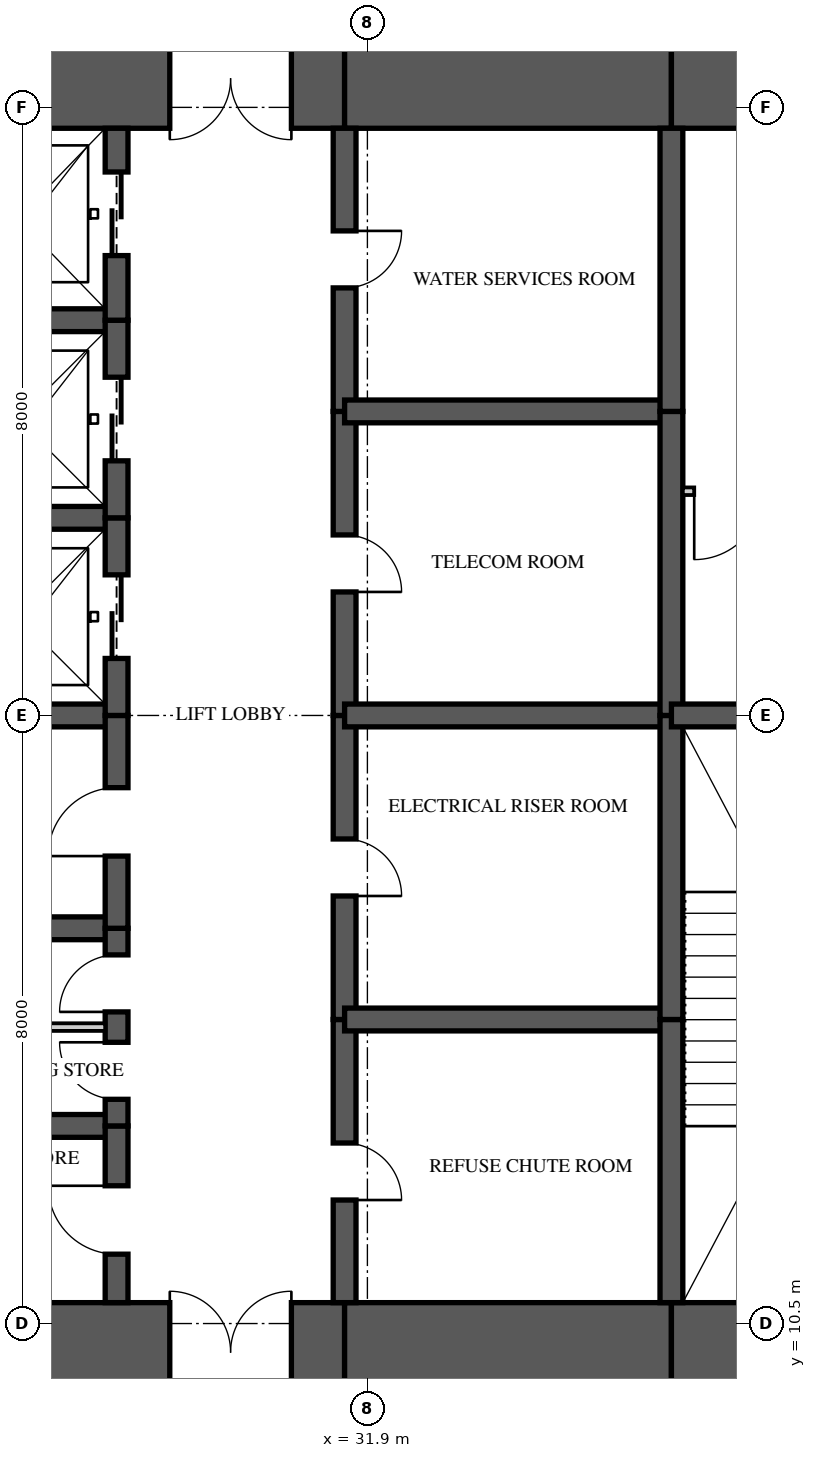
"""IFC4 building model, lengths in metres.
Left out: names, types, materials, properties, quantities, classifications, styles, units other than length and angle.
Written with IfcOpenShell. Run it as: python <this file> out.ifc"""

import sys

from ifc_helpers import new_model, si_unit, direction, frame, frame_2d, origin, place, context, subcontext, project, spatial, rectangle, extrude, element, fill, save


model = new_model("IFC4")
c1 = context("Model", 3, precision=1e-05, world=origin(), true_north=direction((0.0, 1.0)))
c2 = subcontext(c1, "Body", "Model", "MODEL_VIEW")
j1 = project(units=[si_unit("LENGTHUNIT", "METRE"), si_unit("PLANEANGLEUNIT", "RADIAN")], contexts=[c1])
p1 = place(None, origin())
s1 = spatial("IfcSite", under=j1, at=p1, CompositionType="ELEMENT")
p2 = place(p1, origin())
s2 = spatial("IfcBuilding", under=s1, at=p2, CompositionType="ELEMENT")
p3 = place(p2, frame((0.0, 0.0, 157.7)))
s3 = spatial("IfcBuildingStorey", under=s2, at=p3, CompositionType="ELEMENT", Elevation=157.7)
p4 = place(p3, frame((26.0, 10.125, 0.0), z_axis=(0.0, 0.0, 1.0), x_axis=(1.0, 0.0, 0.0)))
e1 = element("IfcWall", 1, at=p4, inside=s3, PredefinedType="SHEAR", context=c2, shape_type="SweptSolid", body=[
    extrude(rectangle(XDim=5.6, YDim=1.3, at=frame_2d((2.8, 0.0))), origin(), (0.0, 0.0, 1.0), 3.35),
])
p5 = place(p4, frame((3.3, 0.0, 0.0)))
e2 = element("IfcOpeningElement", 2, at=p5, cuts=e1, PredefinedType="OPENING", context=c2, shape_type="SweptSolid", body=[
    extrude(rectangle(XDim=1.6, YDim=2.1, at=frame_2d((0.8, 1.05))), frame((0.0, 0.66, 0.0), z_axis=(0.0, -1.0, 0.0), x_axis=(1.0, 0.0, 0.0)), (0.0, 0.0, 1.0), 1.32),
])
p6 = place(p3, frame((31.6, 10.125, 0.0), z_axis=(0.0, 0.0, 1.0), x_axis=(1.0, 0.0, 0.0)))
e3 = element("IfcWall", 3, at=p6, inside=s3, PredefinedType="SHEAR", context=c2, shape_type="SweptSolid", body=[
    extrude(rectangle(XDim=4.3, YDim=1.3, at=frame_2d((2.15, 0.0))), origin(), (0.0, 0.0, 1.0), 3.35),
])
p7 = place(p3, frame((35.9, 10.125, 0.0), z_axis=(0.0, 0.0, 1.0), x_axis=(1.0, 0.0, 0.0)))
e4 = element("IfcWall", 4, at=p7, inside=s3, PredefinedType="SHEAR", context=c2, shape_type="SweptSolid", body=[
    extrude(rectangle(XDim=8.25, YDim=1.3, at=frame_2d((4.125, 0.0))), origin(), (0.0, 0.0, 1.0), 3.35),
])
p8 = place(p7, frame((2.7, 0.0, 0.0)))
e5 = element("IfcOpeningElement", 5, at=p8, cuts=e4, PredefinedType="OPENING", context=c2, shape_type="SweptSolid", body=[
    extrude(rectangle(XDim=1.0, YDim=2.1, at=frame_2d((0.5, 1.05))), frame((0.0, 0.66, 0.0), z_axis=(0.0, -1.0, 0.0), x_axis=(1.0, 0.0, 0.0)), (0.0, 0.0, 1.0), 1.32),
])
p9 = place(p3, frame((44.15, 26.875, 0.0), z_axis=(0.0, 0.0, 1.0), x_axis=(-1.0, 0.0, 0.0)))
e6 = element("IfcWall", 6, at=p9, inside=s3, PredefinedType="SHEAR", context=c2, shape_type="SweptSolid", body=[
    extrude(rectangle(XDim=8.25, YDim=1.3, at=frame_2d((4.125, 0.0))), origin(), (0.0, 0.0, 1.0), 3.35),
])
p10 = place(p9, frame((5.65, 0.0, 0.0)))
e7 = element("IfcOpeningElement", 7, at=p10, cuts=e6, PredefinedType="OPENING", context=c2, shape_type="SweptSolid", body=[
    extrude(rectangle(XDim=0.9, YDim=2.1, at=frame_2d((0.45, 1.05))), frame((0.0, 0.66, 0.0), z_axis=(0.0, -1.0, 0.0), x_axis=(1.0, 0.0, 0.0)), (0.0, 0.0, 1.0), 1.32),
])
p11 = place(p3, frame((35.9, 26.875, 0.0), z_axis=(0.0, 0.0, 1.0), x_axis=(-1.0, 0.0, 0.0)))
e8 = element("IfcWall", 8, at=p11, inside=s3, PredefinedType="SHEAR", context=c2, shape_type="SweptSolid", body=[
    extrude(rectangle(XDim=4.3, YDim=1.3, at=frame_2d((2.15, 0.0))), origin(), (0.0, 0.0, 1.0), 3.35),
])
p12 = place(p3, frame((31.6, 26.875, 0.0), z_axis=(0.0, 0.0, 1.0), x_axis=(-1.0, 0.0, 0.0)))
e9 = element("IfcWall", 9, at=p12, inside=s3, PredefinedType="SHEAR", context=c2, shape_type="SweptSolid", body=[
    extrude(rectangle(XDim=5.6, YDim=1.3, at=frame_2d((2.8, 0.0))), origin(), (0.0, 0.0, 1.0), 3.35),
])
p13 = place(p12, frame((0.7, 0.0, 0.0)))
e10 = element("IfcOpeningElement", 10, at=p13, cuts=e9, PredefinedType="OPENING", context=c2, shape_type="SweptSolid", body=[
    extrude(rectangle(XDim=1.6, YDim=2.1, at=frame_2d((0.8, 1.05))), frame((0.0, 0.66, 0.0), z_axis=(0.0, -1.0, 0.0), x_axis=(1.0, 0.0, 0.0)), (0.0, 0.0, 1.0), 1.32),
])
p14 = place(p3, frame((28.6, 10.775, 0.0), z_axis=(0.0, 0.0, 1.0), x_axis=(0.0, 1.0, 0.0)))
e11 = element("IfcWall", 11, at=p14, inside=s3, PredefinedType="SHEAR", context=c2, shape_type="SweptSolid", body=[
    extrude(rectangle(XDim=2.325, YDim=0.3, at=frame_2d((1.163, 0.0))), origin(), (0.0, 0.0, 1.0), 3.35),
])
p15 = place(p14, frame((0.637, 0.0, 0.0)))
e12 = element("IfcOpeningElement", 12, at=p15, cuts=e11, PredefinedType="OPENING", context=c2, shape_type="SweptSolid", body=[
    extrude(rectangle(XDim=0.9, YDim=2.1, at=frame_2d((0.45, 1.05))), frame((0.0, 0.16, 0.0), z_axis=(0.0, -1.0, 0.0), x_axis=(1.0, 0.0, 0.0)), (0.0, 0.0, 1.0), 0.32),
])
p16 = place(p3, frame((28.6, 13.1, 0.0), z_axis=(0.0, 0.0, 1.0), x_axis=(0.0, 1.0, 0.0)))
e13 = element("IfcWall", 13, at=p16, inside=s3, PredefinedType="SHEAR", context=c2, shape_type="SweptSolid", body=[
    extrude(rectangle(XDim=2.6, YDim=0.3, at=frame_2d((1.3, 0.0))), origin(), (0.0, 0.0, 1.0), 3.35),
])
p17 = place(p16, frame((0.35, 0.0, 0.0)))
e14 = element("IfcOpeningElement", 14, at=p17, cuts=e13, PredefinedType="OPENING", context=c2, shape_type="SweptSolid", body=[
    extrude(rectangle(XDim=0.75, YDim=2.1, at=frame_2d((0.375, 1.05))), frame((0.0, 0.16, 0.0), z_axis=(0.0, -1.0, 0.0), x_axis=(1.0, 0.0, 0.0)), (0.0, 0.0, 1.0), 0.32),
])
p18 = place(p16, frame((1.5, 0.0, 0.0)))
e15 = element("IfcOpeningElement", 15, at=p18, cuts=e13, PredefinedType="OPENING", context=c2, shape_type="SweptSolid", body=[
    extrude(rectangle(XDim=0.75, YDim=2.1, at=frame_2d((0.375, 1.05))), frame((0.0, 0.16, 0.0), z_axis=(0.0, -1.0, 0.0), x_axis=(1.0, 0.0, 0.0)), (0.0, 0.0, 1.0), 0.32),
])
p19 = place(p3, frame((28.6, 15.7, 0.0), z_axis=(0.0, 0.0, 1.0), x_axis=(0.0, 1.0, 0.0)))
e16 = element("IfcWall", 16, at=p19, inside=s3, PredefinedType="SHEAR", context=c2, shape_type="SweptSolid", body=[
    extrude(rectangle(XDim=2.8, YDim=0.3, at=frame_2d((1.4, 0.0))), origin(), (0.0, 0.0, 1.0), 3.35),
])
p20 = place(p19, frame((0.95, 0.0, 0.0)))
e17 = element("IfcOpeningElement", 17, at=p20, cuts=e16, PredefinedType="OPENING", context=c2, shape_type="SweptSolid", body=[
    extrude(rectangle(XDim=0.9, YDim=2.1, at=frame_2d((0.45, 1.05))), frame((0.0, 0.16, 0.0), z_axis=(0.0, -1.0, 0.0), x_axis=(1.0, 0.0, 0.0)), (0.0, 0.0, 1.0), 0.32),
])
p21 = place(p3, frame((28.6, 18.5, 0.0), z_axis=(0.0, 0.0, 1.0), x_axis=(0.0, 1.0, 0.0)))
e18 = element("IfcWall", 18, at=p21, inside=s3, PredefinedType="SHEAR", context=c2, shape_type="SweptSolid", body=[
    extrude(rectangle(XDim=2.6, YDim=0.3, at=frame_2d((1.3, 0.0))), origin(), (0.0, 0.0, 1.0), 3.35),
])
p22 = place(p21, frame((0.75, 0.0, 0.0)))
e19 = element("IfcOpeningElement", 19, at=p22, cuts=e18, PredefinedType="OPENING", context=c2, shape_type="SweptSolid", body=[
    extrude(rectangle(XDim=1.1, YDim=2.1, at=frame_2d((0.55, 1.05))), frame((0.0, 0.16, 0.0), z_axis=(0.0, -1.0, 0.0), x_axis=(1.0, 0.0, 0.0)), (0.0, 0.0, 1.0), 0.32),
])
p23 = place(p3, frame((28.6, 21.1, 0.0), z_axis=(0.0, 0.0, 1.0), x_axis=(0.0, 1.0, 0.0)))
e20 = element("IfcWall", 20, at=p23, inside=s3, PredefinedType="SHEAR", context=c2, shape_type="SweptSolid", body=[
    extrude(rectangle(XDim=2.6, YDim=0.3, at=frame_2d((1.3, 0.0))), origin(), (0.0, 0.0, 1.0), 3.35),
])
p24 = place(p23, frame((0.75, 0.0, 0.0)))
e21 = element("IfcOpeningElement", 21, at=p24, cuts=e20, PredefinedType="OPENING", context=c2, shape_type="SweptSolid", body=[
    extrude(rectangle(XDim=1.1, YDim=2.1, at=frame_2d((0.55, 1.05))), frame((0.0, 0.16, 0.0), z_axis=(0.0, -1.0, 0.0), x_axis=(1.0, 0.0, 0.0)), (0.0, 0.0, 1.0), 0.32),
])
p25 = place(p3, frame((28.6, 23.7, 0.0), z_axis=(0.0, 0.0, 1.0), x_axis=(0.0, 1.0, 0.0)))
e22 = element("IfcWall", 22, at=p25, inside=s3, PredefinedType="SHEAR", context=c2, shape_type="SweptSolid", body=[
    extrude(rectangle(XDim=2.525, YDim=0.3, at=frame_2d((1.263, 0.0))), origin(), (0.0, 0.0, 1.0), 3.35),
])
p26 = place(p25, frame((0.85, 0.0, 0.0)))
e23 = element("IfcOpeningElement", 23, at=p26, cuts=e22, PredefinedType="OPENING", context=c2, shape_type="SweptSolid", body=[
    extrude(rectangle(XDim=1.1, YDim=2.1, at=frame_2d((0.55, 1.05))), frame((0.0, 0.16, 0.0), z_axis=(0.0, -1.0, 0.0), x_axis=(1.0, 0.0, 0.0)), (0.0, 0.0, 1.0), 0.32),
])
p27 = place(p3, frame((31.6, 10.775, 0.0), z_axis=(0.0, 0.0, 1.0), x_axis=(0.0, 1.0, 0.0)))
e24 = element("IfcWall", 24, at=p27, inside=s3, PredefinedType="SHEAR", context=c2, shape_type="SweptSolid", body=[
    extrude(rectangle(XDim=3.725, YDim=0.3, at=frame_2d((1.863, 0.0))), origin(), (0.0, 0.0, 1.0), 3.35),
])
p28 = place(p27, frame((1.35, 0.0, 0.0)))
e25 = element("IfcOpeningElement", 25, at=p28, cuts=e24, PredefinedType="OPENING", context=c2, shape_type="SweptSolid", body=[
    extrude(rectangle(XDim=0.75, YDim=2.1, at=frame_2d((0.375, 1.05))), frame((0.0, 0.16, 0.0), z_axis=(0.0, -1.0, 0.0), x_axis=(1.0, 0.0, 0.0)), (0.0, 0.0, 1.0), 0.32),
])
p29 = place(p3, frame((31.6, 14.5, 0.0), z_axis=(0.0, 0.0, 1.0), x_axis=(0.0, 1.0, 0.0)))
e26 = element("IfcWall", 26, at=p29, inside=s3, PredefinedType="SHEAR", context=c2, shape_type="SweptSolid", body=[
    extrude(rectangle(XDim=4.0, YDim=0.3, at=frame_2d((2.0, 0.0))), origin(), (0.0, 0.0, 1.0), 3.35),
])
p30 = place(p29, frame((1.625, 0.0, 0.0)))
e27 = element("IfcOpeningElement", 27, at=p30, cuts=e26, PredefinedType="OPENING", context=c2, shape_type="SweptSolid", body=[
    extrude(rectangle(XDim=0.75, YDim=2.1, at=frame_2d((0.375, 1.05))), frame((0.0, 0.16, 0.0), z_axis=(0.0, -1.0, 0.0), x_axis=(1.0, 0.0, 0.0)), (0.0, 0.0, 1.0), 0.32),
])
p31 = place(p3, frame((31.6, 18.5, 0.0), z_axis=(0.0, 0.0, 1.0), x_axis=(0.0, 1.0, 0.0)))
e28 = element("IfcWall", 28, at=p31, inside=s3, PredefinedType="SHEAR", context=c2, shape_type="SweptSolid", body=[
    extrude(rectangle(XDim=4.0, YDim=0.3, at=frame_2d((2.0, 0.0))), origin(), (0.0, 0.0, 1.0), 3.35),
])
p32 = place(p31, frame((1.625, 0.0, 0.0)))
e29 = element("IfcOpeningElement", 29, at=p32, cuts=e28, PredefinedType="OPENING", context=c2, shape_type="SweptSolid", body=[
    extrude(rectangle(XDim=0.75, YDim=2.1, at=frame_2d((0.375, 1.05))), frame((0.0, 0.16, 0.0), z_axis=(0.0, -1.0, 0.0), x_axis=(1.0, 0.0, 0.0)), (0.0, 0.0, 1.0), 0.32),
])
p33 = place(p3, frame((31.6, 22.5, 0.0), z_axis=(0.0, 0.0, 1.0), x_axis=(0.0, 1.0, 0.0)))
e30 = element("IfcWall", 30, at=p33, inside=s3, PredefinedType="SHEAR", context=c2, shape_type="SweptSolid", body=[
    extrude(rectangle(XDim=3.725, YDim=0.3, at=frame_2d((1.863, 0.0))), origin(), (0.0, 0.0, 1.0), 3.35),
])
p34 = place(p33, frame((1.625, 0.0, 0.0)))
e31 = element("IfcOpeningElement", 31, at=p34, cuts=e30, PredefinedType="OPENING", context=c2, shape_type="SweptSolid", body=[
    extrude(rectangle(XDim=0.75, YDim=2.1, at=frame_2d((0.375, 1.05))), frame((0.0, 0.16, 0.0), z_axis=(0.0, -1.0, 0.0), x_axis=(1.0, 0.0, 0.0)), (0.0, 0.0, 1.0), 0.32),
])
p35 = place(p3, frame((35.9, 10.775, 0.0), z_axis=(0.0, 0.0, 1.0), x_axis=(0.0, 1.0, 0.0)))
e32 = element("IfcWall", 32, at=p35, inside=s3, PredefinedType="SHEAR", context=c2, shape_type="SweptSolid", body=[
    extrude(rectangle(XDim=3.725, YDim=0.3, at=frame_2d((1.863, 0.0))), origin(), (0.0, 0.0, 1.0), 3.35),
])
for number, where, z_axis, x_axis in (
    (33, (35.9, 14.5, 0.0), (0.0, 0.0, 1.0), (0.0, 1.0, 0.0)),
    (34, (35.9, 18.5, 0.0), (0.0, 0.0, 1.0), (0.0, 1.0, 0.0)),
):
    element("IfcWall", number, at=place(p3, frame(where, z_axis=z_axis, x_axis=x_axis)), inside=s3, PredefinedType="SHEAR", context=c2, shape_type="SweptSolid", body=[
        extrude(rectangle(XDim=4.0, YDim=0.3, at=frame_2d((2.0, 0.0))), origin(), (0.0, 0.0, 1.0), 3.35),
    ])
p36 = place(p3, frame((35.9, 22.5, 0.0), z_axis=(0.0, 0.0, 1.0), x_axis=(0.0, 1.0, 0.0)))
e35 = element("IfcWall", 35, at=p36, inside=s3, PredefinedType="SHEAR", context=c2, shape_type="SweptSolid", body=[
    extrude(rectangle(XDim=3.725, YDim=0.3, at=frame_2d((1.863, 0.0))), origin(), (0.0, 0.0, 1.0), 3.35),
])
for number, where, z_axis, x_axis in (
    (36, (26.0, 13.1, 0.0), (0.0, 0.0, 1.0), (1.0, 0.0, 0.0)),
    (37, (26.0, 15.7, 0.0), (0.0, 0.0, 1.0), (1.0, 0.0, 0.0)),
    (38, (26.0, 18.5, 0.0), (0.0, 0.0, 1.0), (1.0, 0.0, 0.0)),
    (39, (26.0, 21.1, 0.0), (0.0, 0.0, 1.0), (1.0, 0.0, 0.0)),
    (40, (26.0, 23.7, 0.0), (0.0, 0.0, 1.0), (1.0, 0.0, 0.0)),
):
    element("IfcWall", number, at=place(p3, frame(where, z_axis=z_axis, x_axis=x_axis)), inside=s3, PredefinedType="SHEAR", context=c2, shape_type="SweptSolid", body=[
        extrude(rectangle(XDim=2.6, YDim=0.3, at=frame_2d((1.3, 0.0))), origin(), (0.0, 0.0, 1.0), 3.35),
    ])
for number, where, z_axis, x_axis in (
    (41, (31.6, 14.5, 0.0), (0.0, 0.0, 1.0), (1.0, 0.0, 0.0)),
    (42, (31.6, 18.5, 0.0), (0.0, 0.0, 1.0), (1.0, 0.0, 0.0)),
    (43, (31.6, 22.5, 0.0), (0.0, 0.0, 1.0), (1.0, 0.0, 0.0)),
):
    element("IfcWall", number, at=place(p3, frame(where, z_axis=z_axis, x_axis=x_axis)), inside=s3, PredefinedType="SHEAR", context=c2, shape_type="SweptSolid", body=[
        extrude(rectangle(XDim=4.3, YDim=0.3, at=frame_2d((2.15, 0.0))), origin(), (0.0, 0.0, 1.0), 3.35),
    ])
p37 = place(p3, frame((35.9, 18.5, 0.0), z_axis=(0.0, 0.0, 1.0), x_axis=(1.0, 0.0, 0.0)))
e44 = element("IfcWall", 44, at=p37, inside=s3, PredefinedType="SHEAR", context=c2, shape_type="SweptSolid", body=[
    extrude(rectangle(XDim=4.3, YDim=0.3, at=frame_2d((2.15, 0.0))), origin(), (0.0, 0.0, 1.0), 3.35),
])
p38 = place(p3, frame((36.05, 21.45, 0.0), z_axis=(0.0, 0.0, 1.0), x_axis=(1.0, 0.0, 0.0)))
e45 = element("IfcWall", 45, at=p38, inside=s3, PredefinedType="PARTITIONING", context=c2, shape_type="SweptSolid", body=[
    extrude(rectangle(XDim=4.0, YDim=0.1, at=frame_2d((2.0, 0.0))), origin(), (0.0, 0.0, 1.0), 3.11),
])
p39 = place(p38, frame((0.15, 0.0, 0.0)))
e46 = element("IfcOpeningElement", 46, at=p39, cuts=e45, PredefinedType="OPENING", context=c2, shape_type="SweptSolid", body=[
    extrude(rectangle(XDim=0.9, YDim=2.1, at=frame_2d((0.45, 1.05))), frame((0.0, 0.06, 0.0), z_axis=(0.0, -1.0, 0.0), x_axis=(1.0, 0.0, 0.0)), (0.0, 0.0, 1.0), 0.12),
])
p40 = place(p3, frame((26.15, 14.4, 0.0), z_axis=(0.0, 0.0, 1.0), x_axis=(1.0, 0.0, 0.0)))
e47 = element("IfcWall", 47, at=p40, inside=s3, PredefinedType="PARTITIONING", context=c2, shape_type="SweptSolid", body=[
    extrude(rectangle(XDim=2.3, YDim=0.1, at=frame_2d((1.15, 0.0))), origin(), (0.0, 0.0, 1.0), 3.11),
])
p41 = place(p39, frame((0.9, 0.0, 0.0), z_axis=(0.0, 0.0, 1.0), x_axis=(-1.0, 0.0, 0.0)))
e48 = element("IfcDoor", 48, at=p41, inside=s3, OperationType="SINGLE_SWING_RIGHT", PredefinedType="DOOR", context=c2, shape_type="SweptSolid", body=[
    extrude(rectangle(XDim=0.9, YDim=2.1, at=frame_2d((0.45, 1.05))), frame((0.0, 0.025, 0.0), z_axis=(0.0, -1.0, 0.0), x_axis=(1.0, 0.0, 0.0)), (0.0, 0.0, 1.0), 0.05),
])
fill(e46, e48)
p42 = place(p22, origin())
e49 = element("IfcDoor", 49, at=p42, inside=s3, OperationType="SLIDING_TO_LEFT", PredefinedType="DOOR", context=c2, shape_type="SweptSolid", body=[
    extrude(rectangle(XDim=1.1, YDim=2.1, at=frame_2d((0.55, 1.05))), frame((0.0, 0.025, 0.0), z_axis=(0.0, -1.0, 0.0), x_axis=(1.0, 0.0, 0.0)), (0.0, 0.0, 1.0), 0.05),
])
fill(e19, e49)
p43 = place(p24, origin())
e50 = element("IfcDoor", 50, at=p43, inside=s3, OperationType="SLIDING_TO_LEFT", PredefinedType="DOOR", context=c2, shape_type="SweptSolid", body=[
    extrude(rectangle(XDim=1.1, YDim=2.1, at=frame_2d((0.55, 1.05))), frame((0.0, 0.025, 0.0), z_axis=(0.0, -1.0, 0.0), x_axis=(1.0, 0.0, 0.0)), (0.0, 0.0, 1.0), 0.05),
])
fill(e21, e50)
p44 = place(p26, origin())
e51 = element("IfcDoor", 51, at=p44, inside=s3, OperationType="SLIDING_TO_LEFT", PredefinedType="DOOR", context=c2, shape_type="SweptSolid", body=[
    extrude(rectangle(XDim=1.1, YDim=2.1, at=frame_2d((0.55, 1.05))), frame((0.0, 0.025, 0.0), z_axis=(0.0, -1.0, 0.0), x_axis=(1.0, 0.0, 0.0)), (0.0, 0.0, 1.0), 0.05),
])
fill(e23, e51)
p45 = place(p15, origin())
e52 = element("IfcDoor", 52, at=p45, inside=s3, OperationType="SINGLE_SWING_RIGHT", PredefinedType="DOOR", context=c2, shape_type="SweptSolid", body=[
    extrude(rectangle(XDim=0.9, YDim=2.1, at=frame_2d((0.45, 1.05))), frame((0.0, 0.025, 0.0), z_axis=(0.0, -1.0, 0.0), x_axis=(1.0, 0.0, 0.0)), (0.0, 0.0, 1.0), 0.05),
])
fill(e12, e52)
p46 = place(p17, origin())
e53 = element("IfcDoor", 53, at=p46, inside=s3, OperationType="SINGLE_SWING_RIGHT", PredefinedType="DOOR", context=c2, shape_type="SweptSolid", body=[
    extrude(rectangle(XDim=0.75, YDim=2.1, at=frame_2d((0.375, 1.05))), frame((0.0, 0.025, 0.0), z_axis=(0.0, -1.0, 0.0), x_axis=(1.0, 0.0, 0.0)), (0.0, 0.0, 1.0), 0.05),
])
fill(e14, e53)
p47 = place(p18, origin())
e54 = element("IfcDoor", 54, at=p47, inside=s3, OperationType="SINGLE_SWING_LEFT", PredefinedType="DOOR", context=c2, shape_type="SweptSolid", body=[
    extrude(rectangle(XDim=0.75, YDim=2.1, at=frame_2d((0.375, 1.05))), frame((0.0, 0.025, 0.0), z_axis=(0.0, -1.0, 0.0), x_axis=(1.0, 0.0, 0.0)), (0.0, 0.0, 1.0), 0.05),
])
fill(e15, e54)
p48 = place(p20, origin())
e55 = element("IfcDoor", 55, at=p48, inside=s3, OperationType="SINGLE_SWING_LEFT", PredefinedType="DOOR", context=c2, shape_type="SweptSolid", body=[
    extrude(rectangle(XDim=0.9, YDim=2.1, at=frame_2d((0.45, 1.05))), frame((0.0, 0.025, 0.0), z_axis=(0.0, -1.0, 0.0), x_axis=(1.0, 0.0, 0.0)), (0.0, 0.0, 1.0), 0.05),
])
fill(e17, e55)
p49 = place(p5, origin())
e56 = element("IfcDoor", 56, at=p49, inside=s3, OperationType="DOUBLE_DOOR_SINGLE_SWING", PredefinedType="DOOR", context=c2, shape_type="SweptSolid", body=[
    extrude(rectangle(XDim=1.6, YDim=2.1, at=frame_2d((0.8, 1.05))), frame((0.0, 0.025, 0.0), z_axis=(0.0, -1.0, 0.0), x_axis=(1.0, 0.0, 0.0)), (0.0, 0.0, 1.0), 0.05),
])
fill(e2, e56)
p50 = place(p13, origin())
e57 = element("IfcDoor", 57, at=p50, inside=s3, OperationType="DOUBLE_DOOR_SINGLE_SWING", PredefinedType="DOOR", context=c2, shape_type="SweptSolid", body=[
    extrude(rectangle(XDim=1.6, YDim=2.1, at=frame_2d((0.8, 1.05))), frame((0.0, 0.025, 0.0), z_axis=(0.0, -1.0, 0.0), x_axis=(1.0, 0.0, 0.0)), (0.0, 0.0, 1.0), 0.05),
])
fill(e10, e57)
p51 = place(p28, frame((0.75, 0.0, 0.0), z_axis=(0.0, 0.0, 1.0), x_axis=(-1.0, 0.0, 0.0)))
e58 = element("IfcDoor", 58, at=p51, inside=s3, OperationType="SINGLE_SWING_RIGHT", PredefinedType="DOOR", context=c2, shape_type="SweptSolid", body=[
    extrude(rectangle(XDim=0.75, YDim=2.1, at=frame_2d((0.375, 1.05))), frame((0.0, 0.025, 0.0), z_axis=(0.0, -1.0, 0.0), x_axis=(1.0, 0.0, 0.0)), (0.0, 0.0, 1.0), 0.05),
])
fill(e25, e58)
p52 = place(p30, frame((0.75, 0.0, 0.0), z_axis=(0.0, 0.0, 1.0), x_axis=(-1.0, 0.0, 0.0)))
e59 = element("IfcDoor", 59, at=p52, inside=s3, OperationType="SINGLE_SWING_RIGHT", PredefinedType="DOOR", context=c2, shape_type="SweptSolid", body=[
    extrude(rectangle(XDim=0.75, YDim=2.1, at=frame_2d((0.375, 1.05))), frame((0.0, 0.025, 0.0), z_axis=(0.0, -1.0, 0.0), x_axis=(1.0, 0.0, 0.0)), (0.0, 0.0, 1.0), 0.05),
])
fill(e27, e59)
p53 = place(p32, frame((0.75, 0.0, 0.0), z_axis=(0.0, 0.0, 1.0), x_axis=(-1.0, 0.0, 0.0)))
e60 = element("IfcDoor", 60, at=p53, inside=s3, OperationType="SINGLE_SWING_RIGHT", PredefinedType="DOOR", context=c2, shape_type="SweptSolid", body=[
    extrude(rectangle(XDim=0.75, YDim=2.1, at=frame_2d((0.375, 1.05))), frame((0.0, 0.025, 0.0), z_axis=(0.0, -1.0, 0.0), x_axis=(1.0, 0.0, 0.0)), (0.0, 0.0, 1.0), 0.05),
])
fill(e29, e60)
p54 = place(p34, frame((0.75, 0.0, 0.0), z_axis=(0.0, 0.0, 1.0), x_axis=(-1.0, 0.0, 0.0)))
e61 = element("IfcDoor", 61, at=p54, inside=s3, OperationType="SINGLE_SWING_LEFT", PredefinedType="DOOR", context=c2, shape_type="SweptSolid", body=[
    extrude(rectangle(XDim=0.75, YDim=2.1, at=frame_2d((0.375, 1.05))), frame((0.0, 0.025, 0.0), z_axis=(0.0, -1.0, 0.0), x_axis=(1.0, 0.0, 0.0)), (0.0, 0.0, 1.0), 0.05),
])
fill(e31, e61)
save(model, sys.argv[1])
